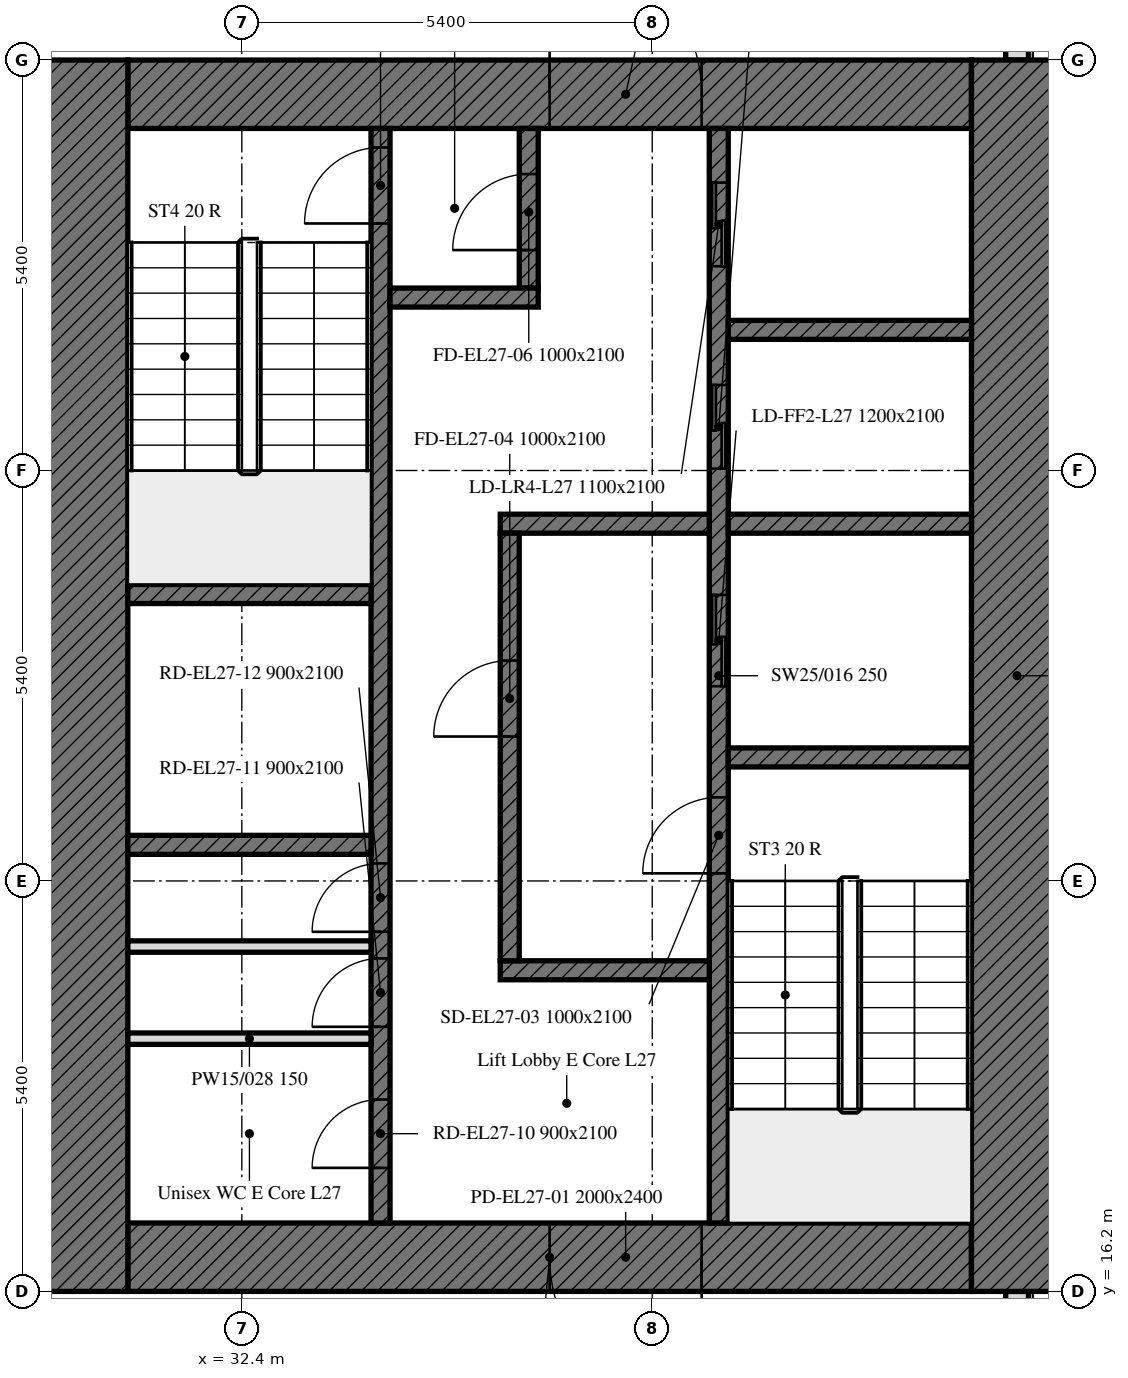
"""IFC4 building model, lengths in metres.
Left out: names, types, materials, properties, quantities, classifications, styles, units other than length and angle.
Written with IfcOpenShell. Run it as: python <this file> out.ifc"""

import sys

from ifc_helpers import new_model, si_unit, direction, frame, frame_2d, origin, place, context, subcontext, project, spatial, rectangle, extrude, element, fill, save


model = new_model("IFC4")
c1 = context("Model", 3, precision=1e-05, world=origin(), true_north=direction((0.0, 1.0)))
c2 = subcontext(c1, "Body", "Model", "MODEL_VIEW")
j1 = project(units=[si_unit("LENGTHUNIT", "METRE"), si_unit("PLANEANGLEUNIT", "RADIAN")], contexts=[c1])
p1 = place(None, origin())
s1 = spatial("IfcSite", under=j1, at=p1, CompositionType="ELEMENT")
p2 = place(p1, origin())
s2 = spatial("IfcBuilding", under=s1, at=p2, CompositionType="ELEMENT")
p3 = place(p2, frame((0.0, 0.0, 114.4)))
s3 = spatial("IfcBuildingStorey", under=s2, at=p3, CompositionType="ELEMENT", Elevation=114.4)
p4 = place(p3, frame((42.6, 10.986, 0.0), z_axis=(0.0, 0.0, 1.0), x_axis=(0.0, 1.0, 0.0)))
e1 = element("IfcWall", 1, at=p4, inside=s3, PredefinedType="SOLIDWALL", context=c2, shape_type="SweptSolid", body=[
    extrude(rectangle(XDim=5.214, YDim=0.3, at=frame_2d((2.607, 0.0))), origin(), (0.0, 0.0, 1.0), 3.5),
])
p5 = place(p3, frame((42.6, 32.4, 0.0), z_axis=(0.0, 0.0, 1.0), x_axis=(0.0, 1.0, 0.0)))
e2 = element("IfcWall", 2, at=p5, inside=s3, PredefinedType="SOLIDWALL", context=c2, shape_type="SweptSolid", body=[
    extrude(rectangle(XDim=10.614, YDim=0.3, at=frame_2d((5.307, 0.0))), origin(), (0.0, 0.0, 1.0), 3.5),
])
p6 = place(p5, frame((6.4, 0.0, 0.9)))
e3 = element("IfcOpeningElement", 3, at=p6, cuts=e2, PredefinedType="OPENING", context=c2, shape_type="SweptSolid", body=[
    extrude(rectangle(XDim=3.4, YDim=1.7, at=frame_2d((1.7, 0.85))), frame((0.0, 0.16, 0.0), z_axis=(0.0, -1.0, 0.0), x_axis=(1.0, 0.0, 0.0)), (0.0, 0.0, 1.0), 0.32),
])
p7 = place(p3, frame((42.0, 16.65, 0.0), z_axis=(0.0, 0.0, 1.0), x_axis=(-1.0, 0.0, 0.0)))
e4 = element("IfcWall", 4, at=p7, inside=s3, PredefinedType="SOLIDWALL", context=c2, shape_type="SweptSolid", body=[
    extrude(rectangle(XDim=11.1, YDim=0.9, at=frame_2d((5.55, 0.0))), origin(), (0.0, 0.0, 1.0), 3.5),
])
p8 = place(p7, frame((3.55, 0.0, 0.0)))
e5 = element("IfcOpeningElement", 5, at=p8, cuts=e4, PredefinedType="OPENING", context=c2, shape_type="SweptSolid", body=[
    extrude(rectangle(XDim=2.0, YDim=2.4, at=frame_2d((1.0, 1.2))), frame((0.0, 0.45, 0.0), z_axis=(0.0, -1.0, 0.0), x_axis=(1.0, 0.0, 0.0)), (0.0, 0.0, 1.0), 0.9),
])
p9 = place(p3, frame((30.9, 31.95, 0.0), z_axis=(0.0, 0.0, 1.0), x_axis=(1.0, 0.0, 0.0)))
e6 = element("IfcWall", 6, at=p9, inside=s3, PredefinedType="SOLIDWALL", context=c2, shape_type="SweptSolid", body=[
    extrude(rectangle(XDim=11.1, YDim=0.9, at=frame_2d((5.55, 0.0))), origin(), (0.0, 0.0, 1.0), 3.5),
])
p10 = place(p9, frame((5.55, 0.0, 0.0)))
e7 = element("IfcOpeningElement", 7, at=p10, cuts=e6, PredefinedType="OPENING", context=c2, shape_type="SweptSolid", body=[
    extrude(rectangle(XDim=2.0, YDim=2.4, at=frame_2d((1.0, 1.2))), frame((0.0, 0.45, 0.0), z_axis=(0.0, -1.0, 0.0), x_axis=(1.0, 0.0, 0.0)), (0.0, 0.0, 1.0), 0.9),
])
for number, where, z_axis, x_axis in (
    (8, (42.6, 32.4, 0.0), (0.0, 0.0, 1.0), (0.0, -1.0, 0.0)),
    (9, (30.3, 16.2, 0.0), (0.0, 0.0, 1.0), (0.0, 1.0, 0.0)),
):
    element("IfcWall", number, at=place(p3, frame(where, z_axis=z_axis, x_axis=x_axis)), inside=s3, PredefinedType="SOLIDWALL", context=c2, shape_type="SweptSolid", body=[
        extrude(rectangle(XDim=16.2, YDim=1.2, at=frame_2d((8.1, 0.0))), origin(), (0.0, 0.0, 1.0), 3.5),
    ])
p11 = place(p3, frame((38.675, 17.1, 0.0), z_axis=(0.0, 0.0, 1.0), x_axis=(0.0, 1.0, 0.0)))
e10 = element("IfcWall", 10, at=p11, inside=s3, PredefinedType="SOLIDWALL", context=c2, shape_type="SweptSolid", body=[
    extrude(rectangle(XDim=14.4, YDim=0.25, at=frame_2d((7.2, 0.0))), origin(), (0.0, 0.0, 1.0), 3.5),
])
p12 = place(p11, frame((4.6, 0.0, 0.0)))
e11 = element("IfcOpeningElement", 11, at=p12, cuts=e10, PredefinedType="OPENING", context=c2, shape_type="SweptSolid", body=[
    extrude(rectangle(XDim=1.0, YDim=2.1, at=frame_2d((0.5, 1.05))), frame((0.0, 0.125, 0.0), z_axis=(0.0, -1.0, 0.0), x_axis=(1.0, 0.0, 0.0)), (0.0, 0.0, 1.0), 0.25),
])
p13 = place(p11, frame((7.062, 0.0, 0.0)))
e12 = element("IfcOpeningElement", 12, at=p13, cuts=e10, PredefinedType="OPENING", context=c2, shape_type="SweptSolid", body=[
    extrude(rectangle(XDim=1.2, YDim=2.1, at=frame_2d((0.6, 1.05))), frame((0.0, 0.125, 0.0), z_axis=(0.0, -1.0, 0.0), x_axis=(1.0, 0.0, 0.0)), (0.0, 0.0, 1.0), 0.25),
])
p14 = place(p11, frame((9.925, 0.0, 0.0)))
e13 = element("IfcOpeningElement", 13, at=p14, cuts=e10, PredefinedType="OPENING", context=c2, shape_type="SweptSolid", body=[
    extrude(rectangle(XDim=1.1, YDim=2.1, at=frame_2d((0.55, 1.05))), frame((0.0, 0.125, 0.0), z_axis=(0.0, -1.0, 0.0), x_axis=(1.0, 0.0, 0.0)), (0.0, 0.0, 1.0), 0.25),
])
p15 = place(p11, frame((12.587, 0.0, 0.0)))
e14 = element("IfcOpeningElement", 14, at=p15, cuts=e10, PredefinedType="OPENING", context=c2, shape_type="SweptSolid", body=[
    extrude(rectangle(XDim=1.1, YDim=2.1, at=frame_2d((0.55, 1.05))), frame((0.0, 0.125, 0.0), z_axis=(0.0, -1.0, 0.0), x_axis=(1.0, 0.0, 0.0)), (0.0, 0.0, 1.0), 0.25),
])
p16 = place(p3, frame((34.225, 17.1, 0.0), z_axis=(0.0, 0.0, 1.0), x_axis=(0.0, 1.0, 0.0)))
e15 = element("IfcWall", 15, at=p16, inside=s3, PredefinedType="SOLIDWALL", context=c2, shape_type="SweptSolid", body=[
    extrude(rectangle(XDim=14.4, YDim=0.25, at=frame_2d((7.2, 0.0))), origin(), (0.0, 0.0, 1.0), 3.5),
])
p17 = place(p16, frame((13.15, 0.0, 0.0)))
e16 = element("IfcOpeningElement", 16, at=p17, cuts=e15, PredefinedType="OPENING", context=c2, shape_type="SweptSolid", body=[
    extrude(rectangle(XDim=1.0, YDim=2.1, at=frame_2d((0.5, 1.05))), frame((0.0, 0.125, 0.0), z_axis=(0.0, -1.0, 0.0), x_axis=(1.0, 0.0, 0.0)), (0.0, 0.0, 1.0), 0.25),
])
p18 = place(p16, frame((0.725, 0.0, 0.0)))
e17 = element("IfcOpeningElement", 17, at=p18, cuts=e15, PredefinedType="OPENING", context=c2, shape_type="SweptSolid", body=[
    extrude(rectangle(XDim=0.9, YDim=2.1, at=frame_2d((0.45, 1.05))), frame((0.0, 0.125, 0.0), z_axis=(0.0, -1.0, 0.0), x_axis=(1.0, 0.0, 0.0)), (0.0, 0.0, 1.0), 0.25),
])
p19 = place(p16, frame((2.581, 0.0, 0.0)))
e18 = element("IfcOpeningElement", 18, at=p19, cuts=e15, PredefinedType="OPENING", context=c2, shape_type="SweptSolid", body=[
    extrude(rectangle(XDim=0.9, YDim=2.1, at=frame_2d((0.45, 1.05))), frame((0.0, 0.125, 0.0), z_axis=(0.0, -1.0, 0.0), x_axis=(1.0, 0.0, 0.0)), (0.0, 0.0, 1.0), 0.25),
])
p20 = place(p16, frame((3.831, 0.0, 0.0)))
e19 = element("IfcOpeningElement", 19, at=p20, cuts=e15, PredefinedType="OPENING", context=c2, shape_type="SweptSolid", body=[
    extrude(rectangle(XDim=0.9, YDim=2.1, at=frame_2d((0.45, 1.05))), frame((0.0, 0.125, 0.0), z_axis=(0.0, -1.0, 0.0), x_axis=(1.0, 0.0, 0.0)), (0.0, 0.0, 1.0), 0.25),
])
p21 = place(p3, frame((38.8, 23.225, 0.0), z_axis=(0.0, 0.0, 1.0), x_axis=(1.0, 0.0, 0.0)))
e20 = element("IfcWall", 20, at=p21, inside=s3, PredefinedType="SOLIDWALL", context=c2, shape_type="SweptSolid", body=[
    extrude(rectangle(XDim=3.2, YDim=0.25, at=frame_2d((1.6, 0.0))), origin(), (0.0, 0.0, 1.0), 3.5),
])
for number, where, z_axis, x_axis in (
    (21, (30.9, 25.375, 0.0), (0.0, 0.0, 1.0), (1.0, 0.0, 0.0)),
    (22, (30.9, 22.075, 0.0), (0.0, 0.0, 1.0), (1.0, 0.0, 0.0)),
):
    element("IfcWall", number, at=place(p3, frame(where, z_axis=z_axis, x_axis=x_axis)), inside=s3, PredefinedType="SOLIDWALL", context=c2, shape_type="SweptSolid", body=[
        extrude(rectangle(XDim=3.2, YDim=0.25, at=frame_2d((1.6, 0.0))), origin(), (0.0, 0.0, 1.0), 3.5),
    ])
p22 = place(p3, frame((38.8, 26.3, 0.0), z_axis=(0.0, 0.0, 1.0), x_axis=(1.0, 0.0, 0.0)))
e23 = element("IfcWall", 23, at=p22, inside=s3, PredefinedType="SOLIDWALL", context=c2, shape_type="SweptSolid", body=[
    extrude(rectangle(XDim=3.2, YDim=0.25, at=frame_2d((1.6, 0.0))), origin(), (0.0, 0.0, 1.0), 3.5),
])
for number, where, z_axis, x_axis in (
    (24, (35.8, 26.3, 0.0), (0.0, 0.0, 1.0), (1.0, 0.0, 0.0)),
    (25, (35.8, 20.425, 0.0), (0.0, 0.0, 1.0), (1.0, 0.0, 0.0)),
):
    element("IfcWall", number, at=place(p3, frame(where, z_axis=z_axis, x_axis=x_axis)), inside=s3, PredefinedType="SOLIDWALL", context=c2, shape_type="SweptSolid", body=[
        extrude(rectangle(XDim=2.75, YDim=0.25, at=frame_2d((1.375, 0.0))), origin(), (0.0, 0.0, 1.0), 3.5),
    ])
p23 = place(p3, frame((36.175, 29.4, 0.0), z_axis=(0.0, 0.0, 1.0), x_axis=(0.0, 1.0, 0.0)))
e26 = element("IfcWall", 26, at=p23, inside=s3, PredefinedType="SOLIDWALL", context=c2, shape_type="SweptSolid", body=[
    extrude(rectangle(XDim=2.1, YDim=0.25, at=frame_2d((1.05, 0.0))), origin(), (0.0, 0.0, 1.0), 3.5),
])
p24 = place(p23, frame((0.5, 0.0, 0.0)))
e27 = element("IfcOpeningElement", 27, at=p24, cuts=e26, PredefinedType="OPENING", context=c2, shape_type="SweptSolid", body=[
    extrude(rectangle(XDim=1.0, YDim=2.1, at=frame_2d((0.5, 1.05))), frame((0.0, 0.125, 0.0), z_axis=(0.0, -1.0, 0.0), x_axis=(1.0, 0.0, 0.0)), (0.0, 0.0, 1.0), 0.25),
])
p25 = place(p3, frame((34.35, 29.275, 0.0), z_axis=(0.0, 0.0, 1.0), x_axis=(1.0, 0.0, 0.0)))
e28 = element("IfcWall", 28, at=p25, inside=s3, PredefinedType="SOLIDWALL", context=c2, shape_type="SweptSolid", body=[
    extrude(rectangle(XDim=1.95, YDim=0.25, at=frame_2d((0.975, 0.0))), origin(), (0.0, 0.0, 1.0), 3.5),
])
p26 = place(p3, frame((35.925, 20.55, 0.0), z_axis=(0.0, 0.0, 1.0), x_axis=(0.0, 1.0, 0.0)))
e29 = element("IfcWall", 29, at=p26, inside=s3, PredefinedType="SOLIDWALL", context=c2, shape_type="SweptSolid", body=[
    extrude(rectangle(XDim=5.625, YDim=0.25, at=frame_2d((2.812, 0.0))), origin(), (0.0, 0.0, 1.0), 3.5),
])
p27 = place(p26, frame((2.95, 0.0, 0.0)))
e30 = element("IfcOpeningElement", 30, at=p27, cuts=e29, PredefinedType="OPENING", context=c2, shape_type="SweptSolid", body=[
    extrude(rectangle(XDim=1.0, YDim=2.1, at=frame_2d((0.5, 1.05))), frame((0.0, 0.125, 0.0), z_axis=(0.0, -1.0, 0.0), x_axis=(1.0, 0.0, 0.0)), (0.0, 0.0, 1.0), 0.25),
])
p28 = place(p3, frame((38.8, 28.85, 0.0), z_axis=(0.0, 0.0, 1.0), x_axis=(1.0, 0.0, 0.0)))
e31 = element("IfcWall", 31, at=p28, inside=s3, PredefinedType="SOLIDWALL", context=c2, shape_type="SweptSolid", body=[
    extrude(rectangle(XDim=3.2, YDim=0.25, at=frame_2d((1.6, 0.0))), origin(), (0.0, 0.0, 1.0), 3.5),
])
for number, where, z_axis, x_axis in (
    (32, (30.9, 19.525, 0.0), (0.0, 0.0, 1.0), (1.0, 0.0, 0.0)),
    (33, (30.9, 20.737, 0.0), (0.0, 0.0, 1.0), (1.0, 0.0, 0.0)),
):
    element("IfcWall", number, at=place(p3, frame(where, z_axis=z_axis, x_axis=x_axis)), inside=s3, PredefinedType="PARTITIONING", context=c2, shape_type="SweptSolid", body=[
        extrude(rectangle(XDim=3.2, YDim=0.15, at=frame_2d((1.6, 0.0))), origin(), (0.0, 0.0, 1.0), 3.5),
    ])
p29 = place(p8, origin())
e34 = element("IfcDoor", 34, at=p29, inside=s3, OperationType="DOUBLE_DOOR_SINGLE_SWING", PredefinedType="DOOR", context=c2, shape_type="SweptSolid", body=[
    extrude(rectangle(XDim=2.0, YDim=2.4, at=frame_2d((1.0, 1.2))), frame((0.0, 0.025, 0.0), z_axis=(0.0, -1.0, 0.0), x_axis=(1.0, 0.0, 0.0)), (0.0, 0.0, 1.0), 0.05),
])
fill(e5, e34)
p30 = place(p10, origin())
e35 = element("IfcDoor", 35, at=p30, inside=s3, OperationType="DOUBLE_DOOR_SINGLE_SWING", PredefinedType="DOOR", context=c2, shape_type="SweptSolid", body=[
    extrude(rectangle(XDim=2.0, YDim=2.4, at=frame_2d((1.0, 1.2))), frame((0.0, 0.025, 0.0), z_axis=(0.0, -1.0, 0.0), x_axis=(1.0, 0.0, 0.0)), (0.0, 0.0, 1.0), 0.05),
])
fill(e7, e35)
p31 = place(p12, origin())
e36 = element("IfcDoor", 36, at=p31, inside=s3, OperationType="SINGLE_SWING_LEFT", PredefinedType="DOOR", context=c2, shape_type="SweptSolid", body=[
    extrude(rectangle(XDim=1.0, YDim=2.1, at=frame_2d((0.5, 1.05))), frame((0.0, 0.025, 0.0), z_axis=(0.0, -1.0, 0.0), x_axis=(1.0, 0.0, 0.0)), (0.0, 0.0, 1.0), 0.05),
])
fill(e11, e36)
p32 = place(p27, origin())
e37 = element("IfcDoor", 37, at=p32, inside=s3, OperationType="SINGLE_SWING_LEFT", PredefinedType="DOOR", context=c2, shape_type="SweptSolid", body=[
    extrude(rectangle(XDim=1.0, YDim=2.1, at=frame_2d((0.5, 1.05))), frame((0.0, 0.025, 0.0), z_axis=(0.0, -1.0, 0.0), x_axis=(1.0, 0.0, 0.0)), (0.0, 0.0, 1.0), 0.05),
])
fill(e30, e37)
p33 = place(p17, origin())
e38 = element("IfcDoor", 38, at=p33, inside=s3, OperationType="SINGLE_SWING_LEFT", PredefinedType="DOOR", context=c2, shape_type="SweptSolid", body=[
    extrude(rectangle(XDim=1.0, YDim=2.1, at=frame_2d((0.5, 1.05))), frame((0.0, 0.025, 0.0), z_axis=(0.0, -1.0, 0.0), x_axis=(1.0, 0.0, 0.0)), (0.0, 0.0, 1.0), 0.05),
])
fill(e16, e38)
p34 = place(p24, origin())
e39 = element("IfcDoor", 39, at=p34, inside=s3, OperationType="SINGLE_SWING_LEFT", PredefinedType="DOOR", context=c2, shape_type="SweptSolid", body=[
    extrude(rectangle(XDim=1.0, YDim=2.1, at=frame_2d((0.5, 1.05))), frame((0.0, 0.025, 0.0), z_axis=(0.0, -1.0, 0.0), x_axis=(1.0, 0.0, 0.0)), (0.0, 0.0, 1.0), 0.05),
])
fill(e27, e39)
p35 = place(p13, origin())
e40 = element("IfcDoor", 40, at=p35, inside=s3, OperationType="DOUBLE_DOOR_SLIDING", PredefinedType="DOOR", context=c2, shape_type="SweptSolid", body=[
    extrude(rectangle(XDim=1.2, YDim=2.1, at=frame_2d((0.6, 1.05))), frame((0.0, 0.025, 0.0), z_axis=(0.0, -1.0, 0.0), x_axis=(1.0, 0.0, 0.0)), (0.0, 0.0, 1.0), 0.05),
])
fill(e12, e40)
p36 = place(p14, origin())
e41 = element("IfcDoor", 41, at=p36, inside=s3, OperationType="DOUBLE_DOOR_SLIDING", PredefinedType="DOOR", context=c2, shape_type="SweptSolid", body=[
    extrude(rectangle(XDim=1.1, YDim=2.1, at=frame_2d((0.55, 1.05))), frame((0.0, 0.025, 0.0), z_axis=(0.0, -1.0, 0.0), x_axis=(1.0, 0.0, 0.0)), (0.0, 0.0, 1.0), 0.05),
])
fill(e13, e41)
p37 = place(p15, origin())
e42 = element("IfcDoor", 42, at=p37, inside=s3, OperationType="DOUBLE_DOOR_SLIDING", PredefinedType="DOOR", context=c2, shape_type="SweptSolid", body=[
    extrude(rectangle(XDim=1.1, YDim=2.1, at=frame_2d((0.55, 1.05))), frame((0.0, 0.025, 0.0), z_axis=(0.0, -1.0, 0.0), x_axis=(1.0, 0.0, 0.0)), (0.0, 0.0, 1.0), 0.05),
])
fill(e14, e42)
p38 = place(p18, origin())
e43 = element("IfcDoor", 43, at=p38, inside=s3, OperationType="SINGLE_SWING_LEFT", PredefinedType="DOOR", context=c2, shape_type="SweptSolid", body=[
    extrude(rectangle(XDim=0.9, YDim=2.1, at=frame_2d((0.45, 1.05))), frame((0.0, 0.025, 0.0), z_axis=(0.0, -1.0, 0.0), x_axis=(1.0, 0.0, 0.0)), (0.0, 0.0, 1.0), 0.05),
])
fill(e17, e43)
p39 = place(p19, origin())
e44 = element("IfcDoor", 44, at=p39, inside=s3, OperationType="SINGLE_SWING_LEFT", PredefinedType="DOOR", context=c2, shape_type="SweptSolid", body=[
    extrude(rectangle(XDim=0.9, YDim=2.1, at=frame_2d((0.45, 1.05))), frame((0.0, 0.025, 0.0), z_axis=(0.0, -1.0, 0.0), x_axis=(1.0, 0.0, 0.0)), (0.0, 0.0, 1.0), 0.05),
])
fill(e18, e44)
p40 = place(p20, origin())
e45 = element("IfcDoor", 45, at=p40, inside=s3, OperationType="SINGLE_SWING_LEFT", PredefinedType="DOOR", context=c2, shape_type="SweptSolid", body=[
    extrude(rectangle(XDim=0.9, YDim=2.1, at=frame_2d((0.45, 1.05))), frame((0.0, 0.025, 0.0), z_axis=(0.0, -1.0, 0.0), x_axis=(1.0, 0.0, 0.0)), (0.0, 0.0, 1.0), 0.05),
])
fill(e19, e45)
save(model, sys.argv[1])
